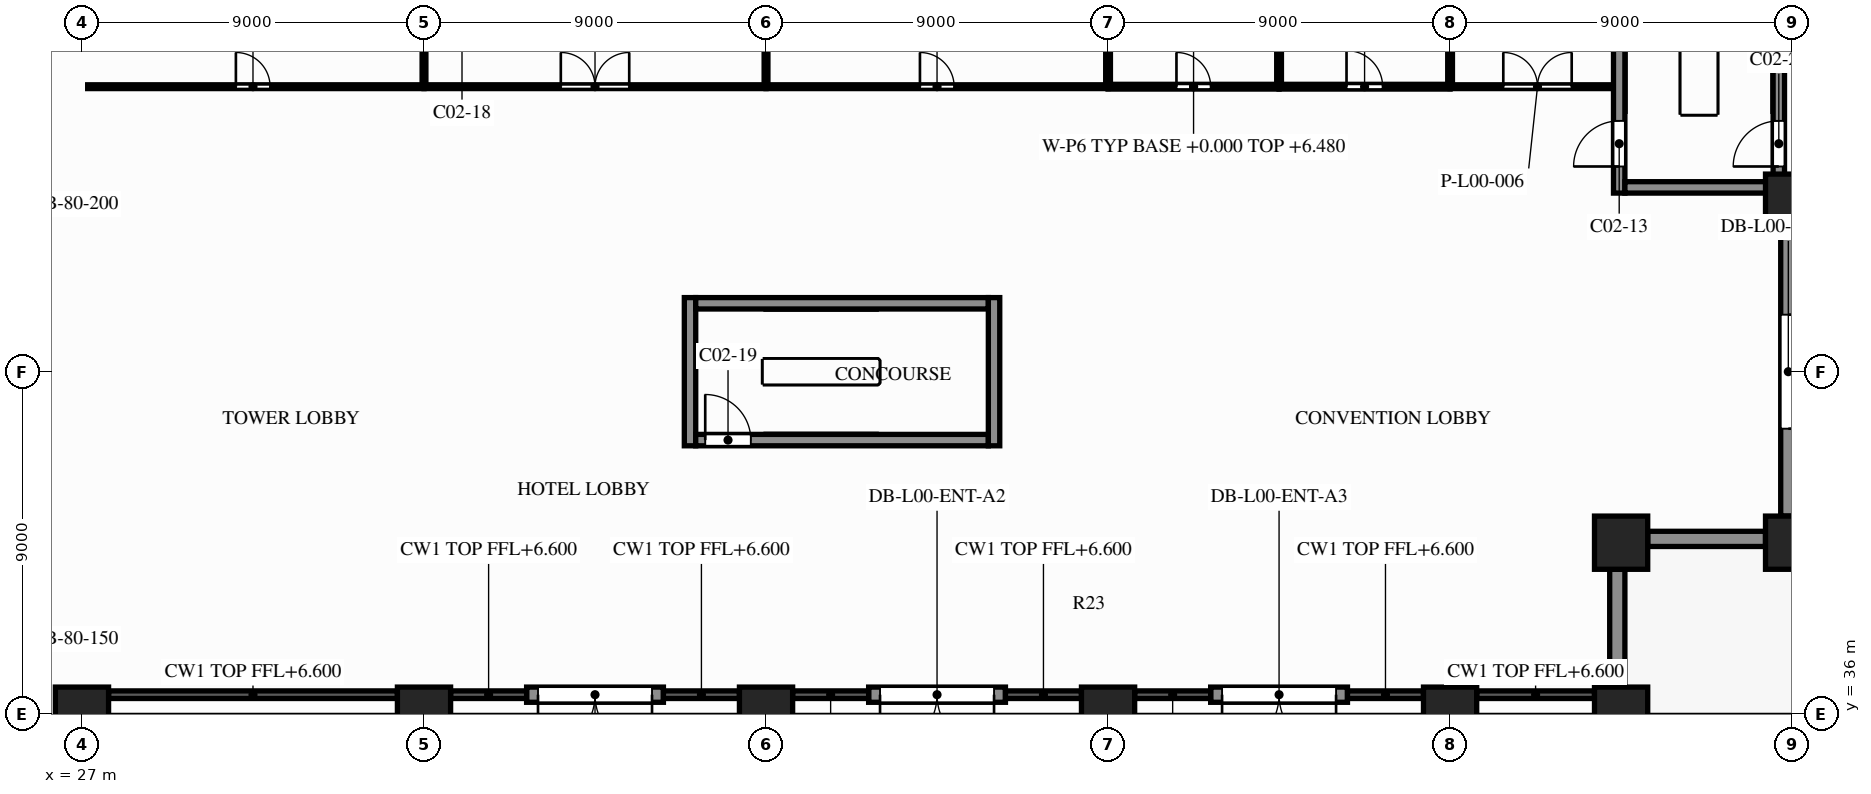
"""IFC4 building model, lengths in metres.
Left out: names, types, materials, properties, quantities, classifications, styles, units other than length and angle.
Written with IfcOpenShell. Run it as: python <this file> out.ifc"""

import sys

from ifc_helpers import new_model, si_unit, direction, frame, frame_2d, origin, origin_2d, place, context, subcontext, project, spatial, rectangle, extrude, element, fill, save


model = new_model("IFC4")
c1 = context("Model", 3, precision=1e-05, world=origin(), true_north=direction((0.0, 1.0)))
c2 = subcontext(c1, "Body", "Model", "MODEL_VIEW")
j1 = project(units=[si_unit("LENGTHUNIT", "METRE"), si_unit("PLANEANGLEUNIT", "RADIAN")], contexts=[c1])
p1 = place(None, origin())
s1 = spatial("IfcSite", under=j1, at=p1, CompositionType="ELEMENT")
p2 = place(p1, origin())
s2 = spatial("IfcBuilding", under=s1, at=p2, CompositionType="ELEMENT")
p3 = place(p2, origin())
s3 = spatial("IfcBuildingStorey", under=s2, at=p3, CompositionType="ELEMENT", Elevation=0.0)
for number, where, z_axis, x_axis in (
    (1, (27.0, 36.0, 0.0), (0.0, 0.0, 1.0), (1.0, 0.0, 0.0)),
    (2, (36.0, 36.0, 0.0), (0.0, 0.0, 1.0), (1.0, 0.0, 0.0)),
    (3, (45.0, 36.0, 0.0), (0.0, 0.0, 1.0), (1.0, 0.0, 0.0)),
    (4, (54.0, 36.0, 0.0), (0.0, 0.0, 1.0), (1.0, 0.0, 0.0)),
    (5, (63.0, 36.0, 0.0), (0.0, 0.0, 1.0), (1.0, 0.0, 0.0)),
    (6, (67.5, 36.0, 0.0), (0.0, 0.0, 1.0), (1.0, 0.0, 0.0)),
    (7, (72.0, 40.5, 0.0), (0.0, 0.0, 1.0), (1.0, 0.0, 0.0)),
    (8, (72.0, 49.5, 0.0), (0.0, 0.0, 1.0), (1.0, 0.0, 0.0)),
    (9, (67.5, 40.5, 0.0), (0.0, 0.0, 1.0), (1.0, 0.0, 0.0)),
):
    element("IfcColumn", number, at=place(p3, frame(where, z_axis=z_axis, x_axis=x_axis)), inside=s3, PredefinedType="COLUMN", context=c2, shape_type="SweptSolid", body=[
        extrude(rectangle(XDim=1.4, YDim=1.4, at=origin_2d()), origin(), (0.0, 0.0, 1.0), 7.5),
    ])
for number, where, z_axis, x_axis in (
    (10, (67.4, 39.8, 0.0), (0.0, 0.0, 1.0), (0.0, -1.0, 0.0)),
    (11, (71.3, 40.6, 0.0), (0.0, 0.0, 1.0), (-1.0, 0.0, 0.0)),
):
    element("IfcWall", number, at=place(p3, frame(where, z_axis=z_axis, x_axis=x_axis)), inside=s3, PredefinedType="SOLIDWALL", context=c2, shape_type="SweptSolid", body=[
        extrude(rectangle(XDim=3.1, YDim=0.4, at=frame_2d((1.55, 0.0))), origin(), (0.0, 0.0, 1.0), 6.6),
    ])
p4 = place(p3, frame((71.9, 48.8, 0.0), z_axis=(0.0, 0.0, 1.0), x_axis=(0.0, -1.0, 0.0)))
e12 = element("IfcWall", 12, at=p4, inside=s3, PredefinedType="SOLIDWALL", context=c2, shape_type="SweptSolid", body=[
    extrude(rectangle(XDim=7.6, YDim=0.4, at=frame_2d((3.8, 0.0))), origin(), (0.0, 0.0, 1.0), 6.6),
])
p5 = place(p4, frame((2.3, 0.0, 0.0)))
e13 = element("IfcOpeningElement", 13, at=p5, cuts=e12, PredefinedType="OPENING", context=c2, shape_type="SweptSolid", body=[
    extrude(rectangle(XDim=3.0, YDim=3.0, at=frame_2d((1.5, 1.5))), frame((0.0, 0.21, 0.0), z_axis=(0.0, -1.0, 0.0), x_axis=(1.0, 0.0, 0.0)), (0.0, 0.0, 1.0), 0.42),
])
p6 = place(p3, frame((42.3, 36.5, 0.0), z_axis=(0.0, 0.0, 1.0), x_axis=(-1.0, 0.0, 0.0)))
e14 = element("IfcWall", 14, at=p6, inside=s3, PredefinedType="SOLIDWALL", context=c2, shape_type="SweptSolid", body=[
    extrude(rectangle(XDim=3.6, YDim=0.4, at=frame_2d((1.8, 0.0))), origin(), (0.0, 0.0, 1.0), 6.6),
])
p7 = place(p6, frame((0.3, 0.0, 0.0)))
e15 = element("IfcOpeningElement", 15, at=p7, cuts=e14, PredefinedType="OPENING", context=c2, shape_type="SweptSolid", body=[
    extrude(rectangle(XDim=3.0, YDim=3.0, at=frame_2d((1.5, 1.5))), frame((0.0, 0.21, 0.0), z_axis=(0.0, -1.0, 0.0), x_axis=(1.0, 0.0, 0.0)), (0.0, 0.0, 1.0), 0.42),
])
p8 = place(p3, frame((51.3, 36.5, 0.0), z_axis=(0.0, 0.0, 1.0), x_axis=(-1.0, 0.0, 0.0)))
e16 = element("IfcWall", 16, at=p8, inside=s3, PredefinedType="SOLIDWALL", context=c2, shape_type="SweptSolid", body=[
    extrude(rectangle(XDim=3.6, YDim=0.4, at=frame_2d((1.8, 0.0))), origin(), (0.0, 0.0, 1.0), 6.6),
])
p9 = place(p8, frame((0.3, 0.0, 0.0)))
e17 = element("IfcOpeningElement", 17, at=p9, cuts=e16, PredefinedType="OPENING", context=c2, shape_type="SweptSolid", body=[
    extrude(rectangle(XDim=3.0, YDim=3.0, at=frame_2d((1.5, 1.5))), frame((0.0, 0.21, 0.0), z_axis=(0.0, -1.0, 0.0), x_axis=(1.0, 0.0, 0.0)), (0.0, 0.0, 1.0), 0.42),
])
p10 = place(p3, frame((60.3, 36.5, 0.0), z_axis=(0.0, 0.0, 1.0), x_axis=(-1.0, 0.0, 0.0)))
e18 = element("IfcWall", 18, at=p10, inside=s3, PredefinedType="SOLIDWALL", context=c2, shape_type="SweptSolid", body=[
    extrude(rectangle(XDim=3.6, YDim=0.4, at=frame_2d((1.8, 0.0))), origin(), (0.0, 0.0, 1.0), 6.6),
])
p11 = place(p10, frame((0.3, 0.0, 0.0)))
e19 = element("IfcOpeningElement", 19, at=p11, cuts=e18, PredefinedType="OPENING", context=c2, shape_type="SweptSolid", body=[
    extrude(rectangle(XDim=3.0, YDim=3.0, at=frame_2d((1.5, 1.5))), frame((0.0, 0.21, 0.0), z_axis=(0.0, -1.0, 0.0), x_axis=(1.0, 0.0, 0.0)), (0.0, 0.0, 1.0), 0.42),
])
p12 = place(p3, frame((43.15, 43.2, 0.0), z_axis=(0.0, 0.0, 1.0), x_axis=(1.0, 0.0, 0.0)))
e20 = element("IfcWall", 20, at=p12, inside=s3, PredefinedType="SHEAR", context=c2, shape_type="SweptSolid", body=[
    extrude(rectangle(XDim=7.7, YDim=0.3, at=frame_2d((3.85, 0.0))), origin(), (0.0, 0.0, 1.0), 7.2),
])
p13 = place(p12, frame((0.25, 0.0, 0.0)))
e21 = element("IfcOpeningElement", 21, at=p13, cuts=e20, PredefinedType="OPENING", context=c2, shape_type="SweptSolid", body=[
    extrude(rectangle(XDim=1.2, YDim=2.2, at=frame_2d((0.6, 1.1))), frame((0.0, 0.16, 0.0), z_axis=(0.0, -1.0, 0.0), x_axis=(1.0, 0.0, 0.0)), (0.0, 0.0, 1.0), 0.32),
])
p14 = place(p3, frame((43.15, 46.8, 0.0), z_axis=(0.0, 0.0, 1.0), x_axis=(1.0, 0.0, 0.0)))
e22 = element("IfcWall", 22, at=p14, inside=s3, PredefinedType="SHEAR", context=c2, shape_type="SweptSolid", body=[
    extrude(rectangle(XDim=7.7, YDim=0.3, at=frame_2d((3.85, 0.0))), origin(), (0.0, 0.0, 1.0), 7.2),
])
for number, where, z_axis, x_axis in (
    (23, (67.6, 49.85, 0.0), (0.0, 0.0, 1.0), (1.0, 0.0, 0.0)),
    (24, (43.0, 43.05, 0.0), (0.0, 0.0, 1.0), (0.0, 1.0, 0.0)),
    (25, (51.0, 43.05, 0.0), (0.0, 0.0, 1.0), (0.0, 1.0, 0.0)),
):
    element("IfcWall", number, at=place(p3, frame(where, z_axis=z_axis, x_axis=x_axis)), inside=s3, PredefinedType="SHEAR", context=c2, shape_type="SweptSolid", body=[
        extrude(rectangle(XDim=3.9, YDim=0.3, at=frame_2d((1.95, 0.0))), origin(), (0.0, 0.0, 1.0), 7.2),
    ])
p15 = place(p3, frame((67.45, 49.7, 0.0), z_axis=(0.0, 0.0, 1.0), x_axis=(0.0, 1.0, 0.0)))
e26 = element("IfcWall", 26, at=p15, inside=s3, PredefinedType="SHEAR", context=c2, shape_type="SweptSolid", body=[
    extrude(rectangle(XDim=8.6, YDim=0.3, at=frame_2d((4.3, 0.0))), origin(), (0.0, 0.0, 1.0), 7.2),
])
p16 = place(p15, frame((0.7, 0.0, 0.0)))
e27 = element("IfcOpeningElement", 27, at=p16, cuts=e26, PredefinedType="OPENING", context=c2, shape_type="SweptSolid", body=[
    extrude(rectangle(XDim=1.2, YDim=2.2, at=frame_2d((0.6, 1.1))), frame((0.0, 0.16, 0.0), z_axis=(0.0, -1.0, 0.0), x_axis=(1.0, 0.0, 0.0)), (0.0, 0.0, 1.0), 0.32),
])
p17 = place(p3, frame((71.65, 49.7, 0.0), z_axis=(0.0, 0.0, 1.0), x_axis=(0.0, 1.0, 0.0)))
e28 = element("IfcWall", 28, at=p17, inside=s3, PredefinedType="SHEAR", context=c2, shape_type="SweptSolid", body=[
    extrude(rectangle(XDim=8.6, YDim=0.3, at=frame_2d((4.3, 0.0))), origin(), (0.0, 0.0, 1.0), 7.2),
])
p18 = place(p17, frame((0.7, 0.0, 0.0)))
e29 = element("IfcOpeningElement", 29, at=p18, cuts=e28, PredefinedType="OPENING", context=c2, shape_type="SweptSolid", body=[
    extrude(rectangle(XDim=1.2, YDim=2.2, at=frame_2d((0.6, 1.1))), frame((0.0, 0.16, 0.0), z_axis=(0.0, -1.0, 0.0), x_axis=(1.0, 0.0, 0.0)), (0.0, 0.0, 1.0), 0.32),
])
p19 = place(p3, frame((27.15, 52.5, 0.0), z_axis=(0.0, 0.0, 1.0), x_axis=(1.0, 0.0, 0.0)))
e30 = element("IfcWall", 30, at=p19, inside=s3, PredefinedType="PARTITIONING", context=c2, shape_type="SweptSolid", body=[
    extrude(rectangle(XDim=8.85, YDim=0.1, at=frame_2d((4.425, 0.0))), origin(), (0.0, 0.0, 1.0), 6.48),
])
p20 = place(p19, frame((3.9, 0.0, 0.0)))
e31 = element("IfcOpeningElement", 31, at=p20, cuts=e30, PredefinedType="OPENING", context=c2, shape_type="SweptSolid", body=[
    extrude(rectangle(XDim=0.9, YDim=2.1, at=frame_2d((0.45, 1.05))), frame((0.0, 0.06, 0.0), z_axis=(0.0, -1.0, 0.0), x_axis=(1.0, 0.0, 0.0)), (0.0, 0.0, 1.0), 0.12),
])
p21 = place(p3, frame((36.0, 52.5, 0.0), z_axis=(0.0, 0.0, 1.0), x_axis=(1.0, 0.0, 0.0)))
e32 = element("IfcWall", 32, at=p21, inside=s3, PredefinedType="PARTITIONING", context=c2, shape_type="SweptSolid", body=[
    extrude(rectangle(XDim=9.0, YDim=0.1, at=frame_2d((4.5, 0.0))), origin(), (0.0, 0.0, 1.0), 6.48),
])
p22 = place(p21, frame((3.6, 0.0, 0.0)))
e33 = element("IfcOpeningElement", 33, at=p22, cuts=e32, PredefinedType="OPENING", context=c2, shape_type="SweptSolid", body=[
    extrude(rectangle(XDim=1.8, YDim=2.1, at=frame_2d((0.9, 1.05))), frame((0.0, 0.06, 0.0), z_axis=(0.0, -1.0, 0.0), x_axis=(1.0, 0.0, 0.0)), (0.0, 0.0, 1.0), 0.12),
])
p23 = place(p3, frame((45.0, 52.5, 0.0), z_axis=(0.0, 0.0, 1.0), x_axis=(1.0, 0.0, 0.0)))
e34 = element("IfcWall", 34, at=p23, inside=s3, PredefinedType="PARTITIONING", context=c2, shape_type="SweptSolid", body=[
    extrude(rectangle(XDim=9.0, YDim=0.1, at=frame_2d((4.5, 0.0))), origin(), (0.0, 0.0, 1.0), 6.48),
])
p24 = place(p23, frame((4.05, 0.0, 0.0)))
e35 = element("IfcOpeningElement", 35, at=p24, cuts=e34, PredefinedType="OPENING", context=c2, shape_type="SweptSolid", body=[
    extrude(rectangle(XDim=0.9, YDim=2.1, at=frame_2d((0.45, 1.05))), frame((0.0, 0.06, 0.0), z_axis=(0.0, -1.0, 0.0), x_axis=(1.0, 0.0, 0.0)), (0.0, 0.0, 1.0), 0.12),
])
p25 = place(p3, frame((54.0, 52.5, 0.0), z_axis=(0.0, 0.0, 1.0), x_axis=(1.0, 0.0, 0.0)))
e36 = element("IfcWall", 36, at=p25, inside=s3, PredefinedType="PARTITIONING", context=c2, shape_type="SweptSolid", body=[
    extrude(rectangle(XDim=4.5, YDim=0.125, at=frame_2d((2.25, 0.0))), origin(), (0.0, 0.0, 1.0), 6.48),
])
p26 = place(p25, frame((1.8, 0.0, 0.0)))
e37 = element("IfcOpeningElement", 37, at=p26, cuts=e36, PredefinedType="OPENING", context=c2, shape_type="SweptSolid", body=[
    extrude(rectangle(XDim=0.9, YDim=2.1, at=frame_2d((0.45, 1.05))), frame((0.0, 0.073, 0.0), z_axis=(0.0, -1.0, 0.0), x_axis=(1.0, 0.0, 0.0)), (0.0, 0.0, 1.0), 0.145),
])
p27 = place(p3, frame((58.5, 52.5, 0.0), z_axis=(0.0, 0.0, 1.0), x_axis=(1.0, 0.0, 0.0)))
e38 = element("IfcWall", 38, at=p27, inside=s3, PredefinedType="PARTITIONING", context=c2, shape_type="SweptSolid", body=[
    extrude(rectangle(XDim=4.5, YDim=0.125, at=frame_2d((2.25, 0.0))), origin(), (0.0, 0.0, 1.0), 6.48),
])
p28 = place(p27, frame((1.775, 0.0, 0.0)))
e39 = element("IfcOpeningElement", 39, at=p28, cuts=e38, PredefinedType="OPENING", context=c2, shape_type="SweptSolid", body=[
    extrude(rectangle(XDim=0.95, YDim=2.1, at=frame_2d((0.475, 1.05))), frame((0.0, 0.073, 0.0), z_axis=(0.0, -1.0, 0.0), x_axis=(1.0, 0.0, 0.0)), (0.0, 0.0, 1.0), 0.145),
])
p29 = place(p3, frame((63.0, 52.5, 0.0), z_axis=(0.0, 0.0, 1.0), x_axis=(1.0, 0.0, 0.0)))
e40 = element("IfcWall", 40, at=p29, inside=s3, PredefinedType="PARTITIONING", context=c2, shape_type="SweptSolid", body=[
    extrude(rectangle(XDim=4.3, YDim=0.1, at=frame_2d((2.15, 0.0))), origin(), (0.0, 0.0, 1.0), 6.48),
])
p30 = place(p29, frame((1.4, 0.0, 0.0)))
e41 = element("IfcOpeningElement", 41, at=p30, cuts=e40, PredefinedType="OPENING", context=c2, shape_type="SweptSolid", body=[
    extrude(rectangle(XDim=1.8, YDim=2.1, at=frame_2d((0.9, 1.05))), frame((0.0, 0.06, 0.0), z_axis=(0.0, -1.0, 0.0), x_axis=(1.0, 0.0, 0.0)), (0.0, 0.0, 1.0), 0.12),
])
p31 = place(p3, frame((36.0, 53.7, 0.0), z_axis=(0.0, 0.0, 1.0), x_axis=(0.0, -1.0, 0.0)))
e42 = element("IfcWall", 42, at=p31, inside=s3, PredefinedType="PARTITIONING", context=c2, shape_type="SweptSolid", body=[
    extrude(rectangle(XDim=1.15, YDim=0.1, at=frame_2d((0.575, 0.0))), origin(), (0.0, 0.0, 1.0), 6.48),
])
p32 = place(p3, frame((54.0, 57.9, 0.0), z_axis=(0.0, 0.0, 1.0), x_axis=(0.0, -1.0, 0.0)))
e43 = element("IfcWall", 43, at=p32, inside=s3, PredefinedType="PARTITIONING", context=c2, shape_type="SweptSolid", body=[
    extrude(rectangle(XDim=5.337, YDim=0.125, at=frame_2d((2.669, 0.0))), origin(), (0.0, 0.0, 1.0), 6.48),
])
p33 = place(p3, frame((58.5, 57.9, 0.0), z_axis=(0.0, 0.0, 1.0), x_axis=(0.0, -1.0, 0.0)))
e44 = element("IfcWall", 44, at=p33, inside=s3, PredefinedType="PARTITIONING", context=c2, shape_type="SweptSolid", body=[
    extrude(rectangle(XDim=5.337, YDim=0.125, at=frame_2d((2.669, 0.0))), origin(), (0.0, 0.0, 1.0), 7.18),
])
p34 = place(p3, frame((63.0, 57.9, 0.0), z_axis=(0.0, 0.0, 1.0), x_axis=(0.0, -1.0, 0.0)))
e45 = element("IfcWall", 45, at=p34, inside=s3, PredefinedType="PARTITIONING", context=c2, shape_type="SweptSolid", body=[
    extrude(rectangle(XDim=5.337, YDim=0.125, at=frame_2d((2.669, 0.0))), origin(), (0.0, 0.0, 1.0), 6.48),
])
p35 = place(p3, frame((45.0, 63.18, 0.0), z_axis=(0.0, 0.0, 1.0), x_axis=(0.0, -1.0, 0.0)))
e46 = element("IfcWall", 46, at=p35, inside=s3, PredefinedType="PARTITIONING", context=c2, shape_type="SweptSolid", body=[
    extrude(rectangle(XDim=10.63, YDim=0.1, at=frame_2d((5.315, 0.0))), origin(), (0.0, 0.0, 1.0), 6.48),
])
p36 = place(p5, origin())
e47 = element("IfcDoor", 47, at=p36, inside=s3, OperationType="DOUBLE_DOOR_SINGLE_SWING", PredefinedType="DOOR", context=c2, shape_type="SweptSolid", body=[
    extrude(rectangle(XDim=3.0, YDim=3.0, at=frame_2d((1.5, 1.5))), frame((0.0, 0.025, 0.0), z_axis=(0.0, -1.0, 0.0), x_axis=(1.0, 0.0, 0.0)), (0.0, 0.0, 1.0), 0.05),
])
fill(e13, e47)
p37 = place(p7, origin())
e48 = element("IfcDoor", 48, at=p37, inside=s3, OperationType="DOUBLE_DOOR_SINGLE_SWING", PredefinedType="DOOR", context=c2, shape_type="SweptSolid", body=[
    extrude(rectangle(XDim=3.0, YDim=3.0, at=frame_2d((1.5, 1.5))), frame((0.0, 0.025, 0.0), z_axis=(0.0, -1.0, 0.0), x_axis=(1.0, 0.0, 0.0)), (0.0, 0.0, 1.0), 0.05),
])
fill(e15, e48)
p38 = place(p9, origin())
e49 = element("IfcDoor", 49, at=p38, inside=s3, OperationType="DOUBLE_DOOR_SINGLE_SWING", PredefinedType="DOOR", context=c2, shape_type="SweptSolid", body=[
    extrude(rectangle(XDim=3.0, YDim=3.0, at=frame_2d((1.5, 1.5))), frame((0.0, 0.025, 0.0), z_axis=(0.0, -1.0, 0.0), x_axis=(1.0, 0.0, 0.0)), (0.0, 0.0, 1.0), 0.05),
])
fill(e17, e49)
p39 = place(p11, origin())
e50 = element("IfcDoor", 50, at=p39, inside=s3, OperationType="DOUBLE_DOOR_SINGLE_SWING", PredefinedType="DOOR", context=c2, shape_type="SweptSolid", body=[
    extrude(rectangle(XDim=3.0, YDim=3.0, at=frame_2d((1.5, 1.5))), frame((0.0, 0.025, 0.0), z_axis=(0.0, -1.0, 0.0), x_axis=(1.0, 0.0, 0.0)), (0.0, 0.0, 1.0), 0.05),
])
fill(e19, e50)
p40 = place(p16, origin())
e51 = element("IfcDoor", 51, at=p40, inside=s3, OperationType="SINGLE_SWING_RIGHT", PredefinedType="DOOR", context=c2, shape_type="SweptSolid", body=[
    extrude(rectangle(XDim=1.2, YDim=2.2, at=frame_2d((0.6, 1.1))), frame((0.0, 0.025, 0.0), z_axis=(0.0, -1.0, 0.0), x_axis=(1.0, 0.0, 0.0)), (0.0, 0.0, 1.0), 0.05),
])
fill(e27, e51)
p41 = place(p13, origin())
e52 = element("IfcDoor", 52, at=p41, inside=s3, OperationType="SINGLE_SWING_RIGHT", PredefinedType="DOOR", context=c2, shape_type="SweptSolid", body=[
    extrude(rectangle(XDim=1.2, YDim=2.2, at=frame_2d((0.6, 1.1))), frame((0.0, 0.025, 0.0), z_axis=(0.0, -1.0, 0.0), x_axis=(1.0, 0.0, 0.0)), (0.0, 0.0, 1.0), 0.05),
])
fill(e21, e52)
p42 = place(p18, origin())
e53 = element("IfcDoor", 53, at=p42, inside=s3, OperationType="SINGLE_SWING_LEFT", PredefinedType="DOOR", context=c2, shape_type="SweptSolid", body=[
    extrude(rectangle(XDim=1.2, YDim=2.2, at=frame_2d((0.6, 1.1))), frame((0.0, 0.025, 0.0), z_axis=(0.0, -1.0, 0.0), x_axis=(1.0, 0.0, 0.0)), (0.0, 0.0, 1.0), 0.05),
])
fill(e29, e53)
p43 = place(p20, origin())
e54 = element("IfcDoor", 54, at=p43, inside=s3, OperationType="SINGLE_SWING_RIGHT", PredefinedType="DOOR", context=c2, shape_type="SweptSolid", body=[
    extrude(rectangle(XDim=0.9, YDim=2.1, at=frame_2d((0.45, 1.05))), frame((0.0, 0.025, 0.0), z_axis=(0.0, -1.0, 0.0), x_axis=(1.0, 0.0, 0.0)), (0.0, 0.0, 1.0), 0.05),
])
fill(e31, e54)
p44 = place(p24, origin())
e55 = element("IfcDoor", 55, at=p44, inside=s3, OperationType="SINGLE_SWING_RIGHT", PredefinedType="DOOR", context=c2, shape_type="SweptSolid", body=[
    extrude(rectangle(XDim=0.9, YDim=2.1, at=frame_2d((0.45, 1.05))), frame((0.0, 0.025, 0.0), z_axis=(0.0, -1.0, 0.0), x_axis=(1.0, 0.0, 0.0)), (0.0, 0.0, 1.0), 0.05),
])
fill(e35, e55)
p45 = place(p26, origin())
e56 = element("IfcDoor", 56, at=p45, inside=s3, OperationType="SINGLE_SWING_LEFT", PredefinedType="DOOR", context=c2, shape_type="SweptSolid", body=[
    extrude(rectangle(XDim=0.9, YDim=2.1, at=frame_2d((0.45, 1.05))), frame((0.0, 0.025, 0.0), z_axis=(0.0, -1.0, 0.0), x_axis=(1.0, 0.0, 0.0)), (0.0, 0.0, 1.0), 0.05),
])
fill(e37, e56)
p46 = place(p28, origin())
e57 = element("IfcDoor", 57, at=p46, inside=s3, OperationType="SINGLE_SWING_LEFT", PredefinedType="DOOR", context=c2, shape_type="SweptSolid", body=[
    extrude(rectangle(XDim=0.95, YDim=2.1, at=frame_2d((0.475, 1.05))), frame((0.0, 0.025, 0.0), z_axis=(0.0, -1.0, 0.0), x_axis=(1.0, 0.0, 0.0)), (0.0, 0.0, 1.0), 0.05),
])
fill(e39, e57)
p47 = place(p22, origin())
e58 = element("IfcDoor", 58, at=p47, inside=s3, OperationType="DOUBLE_DOOR_SINGLE_SWING", PredefinedType="DOOR", context=c2, shape_type="SweptSolid", body=[
    extrude(rectangle(XDim=1.8, YDim=2.1, at=frame_2d((0.9, 1.05))), frame((0.0, 0.025, 0.0), z_axis=(0.0, -1.0, 0.0), x_axis=(1.0, 0.0, 0.0)), (0.0, 0.0, 1.0), 0.05),
])
fill(e33, e58)
p48 = place(p30, origin())
e59 = element("IfcDoor", 59, at=p48, inside=s3, OperationType="DOUBLE_DOOR_SINGLE_SWING", PredefinedType="DOOR", context=c2, shape_type="SweptSolid", body=[
    extrude(rectangle(XDim=1.8, YDim=2.1, at=frame_2d((0.9, 1.05))), frame((0.0, 0.025, 0.0), z_axis=(0.0, -1.0, 0.0), x_axis=(1.0, 0.0, 0.0)), (0.0, 0.0, 1.0), 0.05),
])
fill(e41, e59)
save(model, sys.argv[1])
